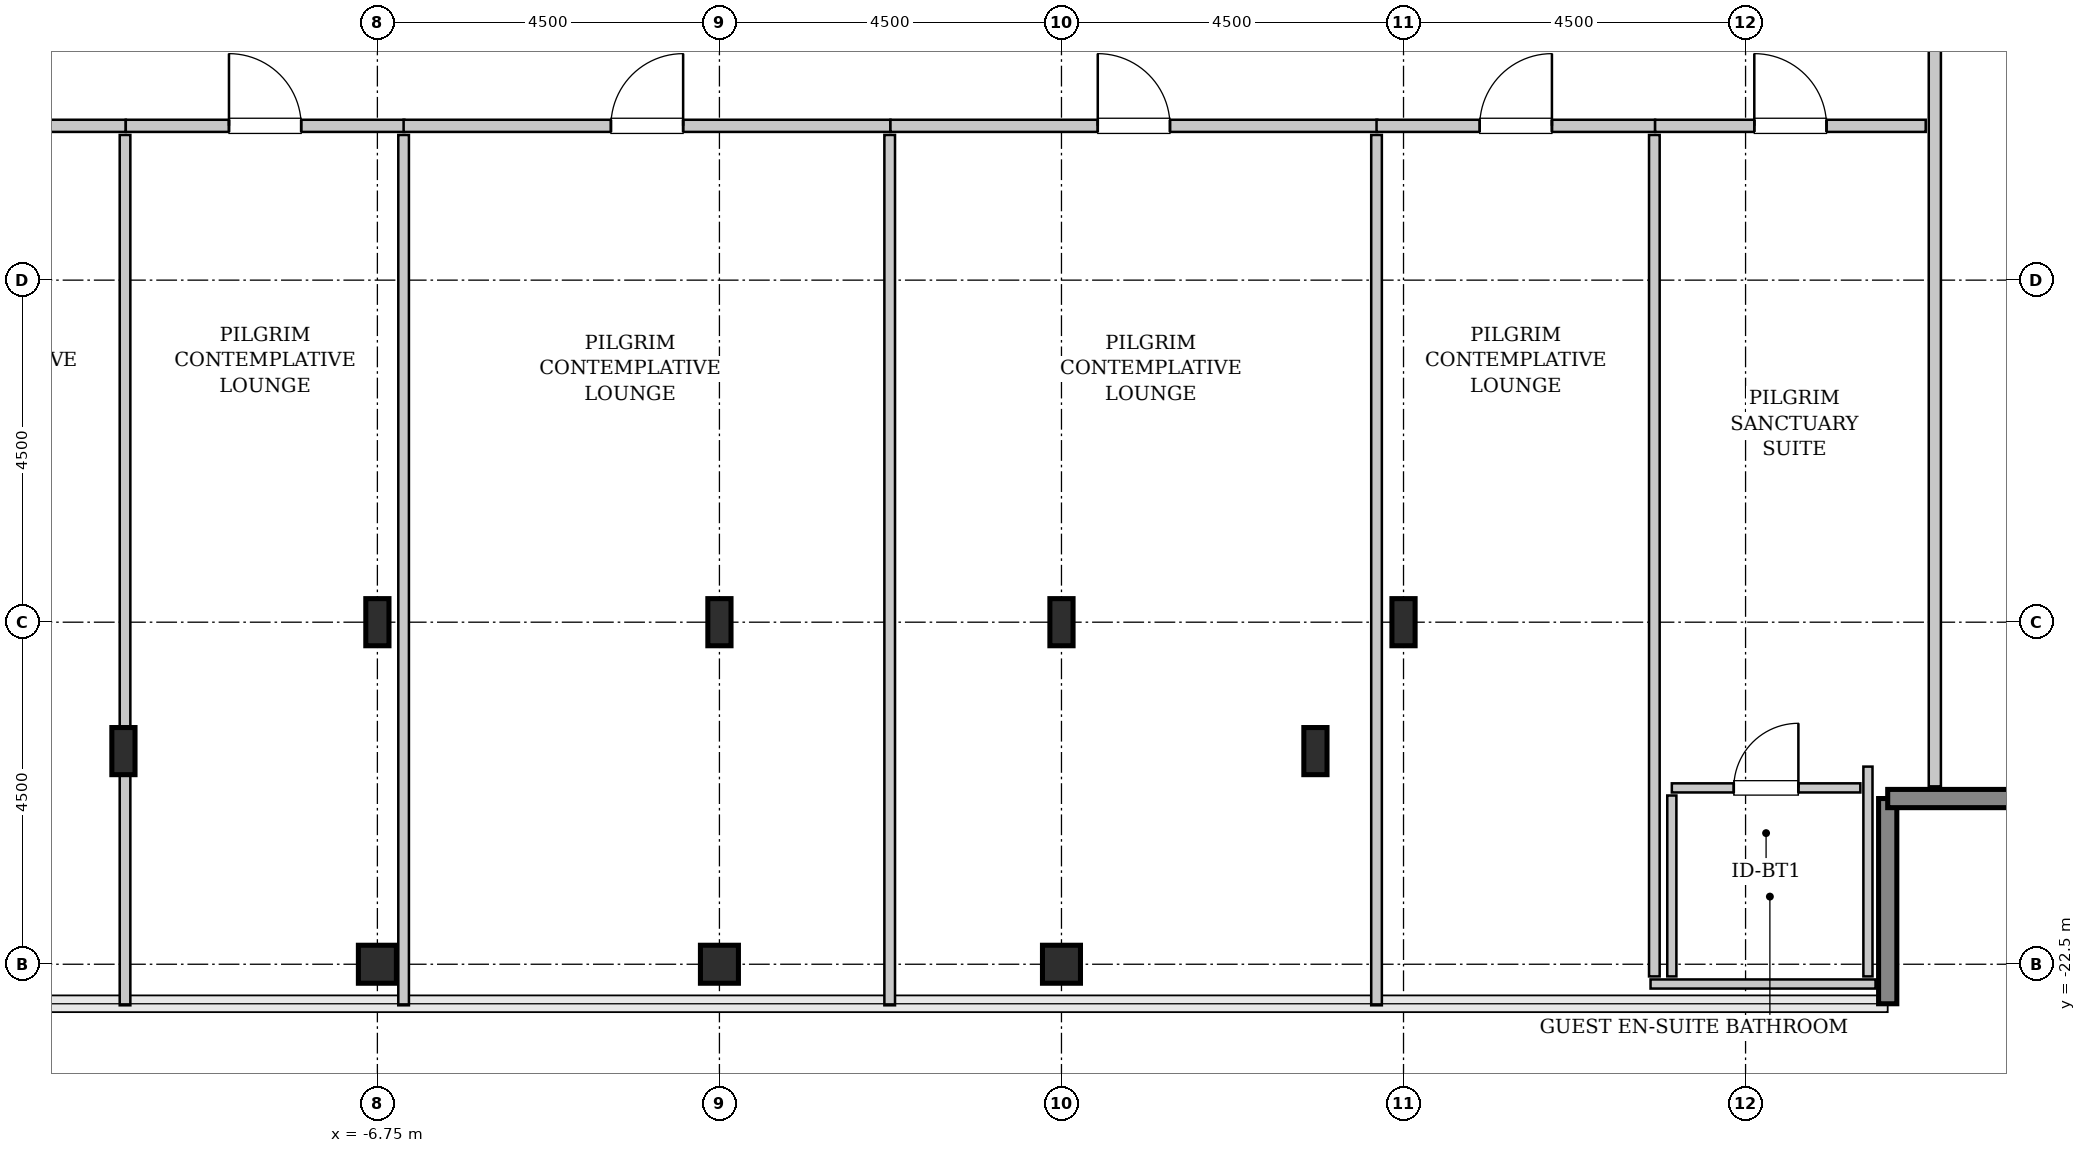
"""IFC4 building model, lengths in metres.
Left out: names, types, materials, properties, quantities, classifications, styles, units other than length and angle.
Written with IfcOpenShell. Run it as: python <this file> out.ifc"""

import sys

from ifc_helpers import new_model, si_unit, direction, frame, frame_2d, origin, origin_2d, place, context, subcontext, project, spatial, rectangle, hollow_rectangle, i_section, extrude, source, transform, mapped, element, fill, save


model = new_model("IFC4")
c1 = context("Model", 3, precision=1e-05, world=origin(), true_north=direction((0.0, 1.0)))
c2 = subcontext(c1, "Body", "Model", "MODEL_VIEW")
j1 = project(units=[si_unit("LENGTHUNIT", "METRE"), si_unit("PLANEANGLEUNIT", "RADIAN")], contexts=[c1])
p1 = place(None, origin())
s1 = spatial("IfcSite", under=j1, at=p1, CompositionType="ELEMENT")
p2 = place(p1, origin())
s2 = spatial("IfcBuilding", under=s1, at=p2, CompositionType="ELEMENT")
p3 = place(p2, frame((0.0, 0.0, 306.4)))
s3 = spatial("IfcBuildingStorey", under=s2, at=p3, CompositionType="ELEMENT", Elevation=306.4)
m1 = source(origin(), c2, "Body", "SweptSolid", [
    extrude(i_section(OverallWidth=0.305, OverallDepth=0.62, WebThickness=0.021, FlangeThickness=0.04, FilletRadius=0.027, at=origin_2d()), origin(), (0.0, 0.0, 1.0), 3.8),
])
p4 = place(p3, frame((-10.091, -19.696, 0.0), z_axis=(0.0, 0.0, 1.0), x_axis=(1.0, 0.0, 0.0)))
e1 = element("IfcColumn", 1, at=p4, inside=s3, PredefinedType="COLUMN", context=c2, shape_type="MappedRepresentation", body=[
    mapped(m1, transform((0.0, 0.0, 0.0), x_axis=(1.0, 0.0, 0.0), y_axis=(0.0, 1.0, 0.0), z_axis=(0.0, 0.0, 1.0), scale=1.0)),
])
m2 = source(origin(), c2, "Body", "SweptSolid", [
    extrude(hollow_rectangle(XDim=0.5, YDim=0.5, WallThickness=0.025, InnerFilletRadius=0.025, OuterFilletRadius=0.05, at=origin_2d()), origin(), (0.0, 0.0, 1.0), 3.8),
])
p5 = place(p3, frame((-6.75, -22.5, 0.0), z_axis=(0.0, 0.0, 1.0), x_axis=(1.0, 0.0, 0.0)))
e2 = element("IfcColumn", 2, at=p5, inside=s3, PredefinedType="COLUMN", context=c2, shape_type="MappedRepresentation", body=[
    mapped(m2, transform((0.0, 0.0, 0.0), x_axis=(1.0, 0.0, 0.0), y_axis=(0.0, 1.0, 0.0), z_axis=(0.0, 0.0, 1.0), scale=1.0)),
])
p6 = place(p3, frame((-6.75, -18.0, 0.0), z_axis=(0.0, 0.0, 1.0), x_axis=(1.0, 0.0, 0.0)))
e3 = element("IfcColumn", 3, at=p6, inside=s3, PredefinedType="COLUMN", context=c2, shape_type="MappedRepresentation", body=[
    mapped(m1, transform((0.0, 0.0, 0.0), x_axis=(1.0, 0.0, 0.0), y_axis=(0.0, 1.0, 0.0), z_axis=(0.0, 0.0, 1.0), scale=1.0)),
])
p7 = place(p3, frame((-2.25, -22.5, 0.0), z_axis=(0.0, 0.0, 1.0), x_axis=(1.0, 0.0, 0.0)))
e4 = element("IfcColumn", 4, at=p7, inside=s3, PredefinedType="COLUMN", context=c2, shape_type="MappedRepresentation", body=[
    mapped(m2, transform((0.0, 0.0, 0.0), x_axis=(1.0, 0.0, 0.0), y_axis=(0.0, 1.0, 0.0), z_axis=(0.0, 0.0, 1.0), scale=1.0)),
])
p8 = place(p3, frame((-2.25, -18.0, 0.0), z_axis=(0.0, 0.0, 1.0), x_axis=(1.0, 0.0, 0.0)))
e5 = element("IfcColumn", 5, at=p8, inside=s3, PredefinedType="COLUMN", context=c2, shape_type="MappedRepresentation", body=[
    mapped(m1, transform((0.0, 0.0, 0.0), x_axis=(1.0, 0.0, 0.0), y_axis=(0.0, 1.0, 0.0), z_axis=(0.0, 0.0, 1.0), scale=1.0)),
])
p9 = place(p3, frame((2.25, -22.5, 0.0), z_axis=(0.0, 0.0, 1.0), x_axis=(1.0, 0.0, 0.0)))
e6 = element("IfcColumn", 6, at=p9, inside=s3, PredefinedType="COLUMN", context=c2, shape_type="MappedRepresentation", body=[
    mapped(m2, transform((0.0, 0.0, 0.0), x_axis=(1.0, 0.0, 0.0), y_axis=(0.0, 1.0, 0.0), z_axis=(0.0, 0.0, 1.0), scale=1.0)),
])
for number, where, z_axis, x_axis in (
    (7, (2.25, -18.0, 0.0), (0.0, 0.0, 1.0), (1.0, 0.0, 0.0)),
    (8, (5.591, -19.696, 0.0), (0.0, 0.0, 1.0), (1.0, 0.0, 0.0)),
    (9, (6.75, -18.0, 0.0), (0.0, 0.0, 1.0), (1.0, 0.0, 0.0)),
):
    element("IfcColumn", number, at=place(p3, frame(where, z_axis=z_axis, x_axis=x_axis)), inside=s3, PredefinedType="COLUMN", context=c2, shape_type="MappedRepresentation", body=[
        mapped(m1, transform((0.0, 0.0, 0.0), x_axis=(1.0, 0.0, 0.0), y_axis=(0.0, 1.0, 0.0), z_axis=(0.0, 0.0, 1.0), scale=1.0)),
    ])
m3 = source(origin(), c2, "Body", "SweptSolid", [
    extrude(rectangle(XDim=2.7, YDim=0.24, at=frame_2d((1.35, 0.0))), origin(), (0.0, 0.0, 1.0), 3.55),
])
for number, where, z_axis, x_axis in (
    (10, (13.12, -23.02, 0.0), (0.0, 0.0, 1.0), (0.0, 1.0, 0.0)),
    (11, (13.12, -20.32, 0.0), (0.0, 0.0, 1.0), (1.0, 0.0, 0.0)),
):
    element("IfcWall", number, at=place(p3, frame(where, z_axis=z_axis, x_axis=x_axis)), inside=s3, PredefinedType="SHEAR", context=c2, shape_type="MappedRepresentation", body=[
        mapped(m3, transform((0.0, 0.0, 0.0), x_axis=(1.0, 0.0, 0.0), y_axis=(0.0, 1.0, 0.0), z_axis=(0.0, 0.0, 1.0), scale=1.0)),
    ])
m4 = source(origin(), c2, "Body", "SweptSolid", [
    extrude(rectangle(XDim=2.96, YDim=0.12, at=frame_2d((1.48, 0.0))), origin(), (0.0, 0.0, 1.0), 3.535),
])
p10 = place(p3, frame((10.0, -22.76, 0.0), z_axis=(0.0, 0.0, 1.0), x_axis=(1.0, 0.0, 0.0)))
e12 = element("IfcWall", 12, at=p10, inside=s3, PredefinedType="PLUMBINGWALL", context=c2, shape_type="MappedRepresentation", body=[
    mapped(m4, transform((0.0, 0.0, 0.0), x_axis=(1.0, 0.0, 0.0), y_axis=(0.0, 1.0, 0.0), z_axis=(0.0, 0.0, 1.0), scale=1.0)),
])
m5 = source(origin(), c2, "Body", "SweptSolid", [
    extrude(rectangle(XDim=2.76, YDim=0.12, at=frame_2d((1.38, 0.0))), origin(), (0.0, 0.0, 1.0), 3.535),
])
p11 = place(p3, frame((12.86, -22.66, 0.0), z_axis=(0.0, 0.0, 1.0), x_axis=(0.0, 1.0, 0.0)))
e13 = element("IfcWall", 13, at=p11, inside=s3, PredefinedType="PLUMBINGWALL", context=c2, shape_type="MappedRepresentation", body=[
    mapped(m5, transform((0.0, 0.0, 0.0), x_axis=(1.0, 0.0, 0.0), y_axis=(0.0, 1.0, 0.0), z_axis=(0.0, 0.0, 1.0), scale=1.0)),
])
m6 = source(origin(), c2, "Body", "SweptSolid", [
    extrude(rectangle(XDim=2.48, YDim=0.12, at=frame_2d((1.24, 0.0))), origin(), (0.0, 0.0, 1.0), 3.535),
])
p12 = place(p3, frame((10.28, -20.18, 0.0), z_axis=(0.0, 0.0, 1.0), x_axis=(1.0, 0.0, 0.0)))
e14 = element("IfcWall", 14, at=p12, inside=s3, PredefinedType="PLUMBINGWALL", context=c2, shape_type="MappedRepresentation", body=[
    mapped(m6, transform((0.0, 0.0, 0.0), x_axis=(1.0, 0.0, 0.0), y_axis=(0.0, 1.0, 0.0), z_axis=(0.0, 0.0, 1.0), scale=1.0)),
])
p13 = place(p12, frame((0.815, 0.0, 0.0)))
e15 = element("IfcOpeningElement", 15, at=p13, cuts=e14, PredefinedType="OPENING", context=c2, shape_type="SweptSolid", body=[
    extrude(rectangle(XDim=0.85, YDim=2.1, at=frame_2d((0.425, 1.05))), frame((0.0, 0.07, 0.0), z_axis=(0.0, -1.0, 0.0), x_axis=(1.0, 0.0, 0.0)), (0.0, 0.0, 1.0), 0.14),
])
m7 = source(origin(), c2, "Body", "SweptSolid", [
    extrude(rectangle(XDim=2.38, YDim=0.12, at=frame_2d((1.19, 0.0))), origin(), (0.0, 0.0, 1.0), 3.535),
])
p14 = place(p3, frame((10.28, -22.66, 0.0), z_axis=(0.0, 0.0, 1.0), x_axis=(0.0, 1.0, 0.0)))
e16 = element("IfcWall", 16, at=p14, inside=s3, PredefinedType="PLUMBINGWALL", context=c2, shape_type="MappedRepresentation", body=[
    mapped(m7, transform((0.0, 0.0, 0.0), x_axis=(1.0, 0.0, 0.0), y_axis=(0.0, 1.0, 0.0), z_axis=(0.0, 0.0, 1.0), scale=1.0)),
])
m8 = source(origin(), c2, "Body", "SweptSolid", [
    extrude(rectangle(XDim=14.365, YDim=0.16, at=frame_2d((7.183, 0.0))), origin(), (0.0, 0.0, 1.0), 3.535),
])
p15 = place(p3, frame((13.74, -20.16, 0.0), z_axis=(0.0, 0.0, 1.0), x_axis=(0.0, 1.0, 0.0)))
e17 = element("IfcWall", 17, at=p15, inside=s3, PredefinedType="PARTITIONING", context=c2, shape_type="MappedRepresentation", body=[
    mapped(m8, transform((0.0, 0.0, 0.0), x_axis=(1.0, 0.0, 0.0), y_axis=(0.0, 1.0, 0.0), z_axis=(0.0, 0.0, 1.0), scale=1.0)),
])
p16 = place(p15, frame((11.032, 0.0, 0.0)))
e18 = element("IfcOpeningElement", 18, at=p16, cuts=e17, PredefinedType="OPENING", context=c2, shape_type="SweptSolid", body=[
    extrude(rectangle(XDim=0.95, YDim=2.1, at=frame_2d((0.475, 1.05))), frame((0.0, 0.09, 0.0), z_axis=(0.0, -1.0, 0.0), x_axis=(1.0, 0.0, 0.0)), (0.0, 0.0, 1.0), 0.18),
])
m9 = source(origin(), c2, "Body", "SweptSolid", [
    extrude(rectangle(XDim=3.56, YDim=0.16, at=frame_2d((1.78, 0.0))), origin(), (0.0, 0.0, 1.0), 3.535),
])
p17 = place(p3, frame((-13.62, -11.47, 0.0), z_axis=(0.0, 0.0, 1.0), x_axis=(1.0, 0.0, 0.0)))
e19 = element("IfcWall", 19, at=p17, inside=s3, PredefinedType="PARTITIONING", context=c2, shape_type="MappedRepresentation", body=[
    mapped(m9, transform((0.0, 0.0, 0.0), x_axis=(1.0, 0.0, 0.0), y_axis=(0.0, 1.0, 0.0), z_axis=(0.0, 0.0, 1.0), scale=1.0)),
])
p18 = place(p17, frame((1.305, 0.0, 0.0)))
e20 = element("IfcOpeningElement", 20, at=p18, cuts=e19, PredefinedType="OPENING", context=c2, shape_type="SweptSolid", body=[
    extrude(rectangle(XDim=0.95, YDim=2.1, at=frame_2d((0.475, 1.05))), frame((0.0, 0.09, 0.0), z_axis=(0.0, -1.0, 0.0), x_axis=(1.0, 0.0, 0.0)), (0.0, 0.0, 1.0), 0.18),
])
m10 = source(origin(), c2, "Body", "SweptSolid", [
    extrude(rectangle(XDim=11.45, YDim=0.14, at=frame_2d((5.725, 0.0))), origin(), (0.0, 0.0, 1.0), 3.535),
])
p19 = place(p3, frame((-10.07, -23.04, 0.0), z_axis=(0.0, 0.0, 1.0), x_axis=(0.0, 1.0, 0.0)))
e21 = element("IfcWall", 21, at=p19, inside=s3, PredefinedType="PARTITIONING", context=c2, shape_type="MappedRepresentation", body=[
    mapped(m10, transform((0.0, 0.0, 0.0), x_axis=(1.0, 0.0, 0.0), y_axis=(0.0, 1.0, 0.0), z_axis=(0.0, 0.0, 1.0), scale=1.0)),
])
m11 = source(origin(), c2, "Body", "SweptSolid", [
    extrude(rectangle(XDim=3.665, YDim=0.16, at=frame_2d((1.833, 0.0))), origin(), (0.0, 0.0, 1.0), 3.535),
])
p20 = place(p3, frame((-10.06, -11.47, 0.0), z_axis=(0.0, 0.0, 1.0), x_axis=(1.0, 0.0, 0.0)))
e22 = element("IfcWall", 22, at=p20, inside=s3, PredefinedType="PARTITIONING", context=c2, shape_type="MappedRepresentation", body=[
    mapped(m11, transform((0.0, 0.0, 0.0), x_axis=(1.0, 0.0, 0.0), y_axis=(0.0, 1.0, 0.0), z_axis=(0.0, 0.0, 1.0), scale=1.0)),
])
p21 = place(p20, frame((1.357, 0.0, 0.0)))
e23 = element("IfcOpeningElement", 23, at=p21, cuts=e22, PredefinedType="OPENING", context=c2, shape_type="SweptSolid", body=[
    extrude(rectangle(XDim=0.95, YDim=2.1, at=frame_2d((0.475, 1.05))), frame((0.0, 0.09, 0.0), z_axis=(0.0, -1.0, 0.0), x_axis=(1.0, 0.0, 0.0)), (0.0, 0.0, 1.0), 0.18),
])
m12 = source(origin(), c2, "Body", "SweptSolid", [
    extrude(rectangle(XDim=11.45, YDim=0.14, at=frame_2d((5.725, 0.0))), origin(), (0.0, 0.0, 1.0), 2.975),
])
p22 = place(p3, frame((-6.405, -23.04, 0.0), z_axis=(0.0, 0.0, 1.0), x_axis=(0.0, 1.0, 0.0)))
e24 = element("IfcWall", 24, at=p22, inside=s3, PredefinedType="PARTITIONING", context=c2, shape_type="MappedRepresentation", body=[
    mapped(m12, transform((0.0, 0.0, 0.0), x_axis=(1.0, 0.0, 0.0), y_axis=(0.0, 1.0, 0.0), z_axis=(0.0, 0.0, 1.0), scale=1.0)),
])
m13 = source(origin(), c2, "Body", "SweptSolid", [
    extrude(rectangle(XDim=6.405, YDim=0.16, at=frame_2d((3.203, 0.0))), origin(), (0.0, 0.0, 1.0), 3.535),
])
p23 = place(p3, frame((-6.405, -11.47, 0.0), z_axis=(0.0, 0.0, 1.0), x_axis=(1.0, 0.0, 0.0)))
e25 = element("IfcWall", 25, at=p23, inside=s3, PredefinedType="PARTITIONING", context=c2, shape_type="MappedRepresentation", body=[
    mapped(m13, transform((0.0, 0.0, 0.0), x_axis=(1.0, 0.0, 0.0), y_axis=(0.0, 1.0, 0.0), z_axis=(0.0, 0.0, 1.0), scale=1.0)),
])
p24 = place(p23, frame((2.728, 0.0, 0.0)))
e26 = element("IfcOpeningElement", 26, at=p24, cuts=e25, PredefinedType="OPENING", context=c2, shape_type="SweptSolid", body=[
    extrude(rectangle(XDim=0.95, YDim=2.1, at=frame_2d((0.475, 1.05))), frame((0.0, 0.09, 0.0), z_axis=(0.0, -1.0, 0.0), x_axis=(1.0, 0.0, 0.0)), (0.0, 0.0, 1.0), 0.18),
])
p25 = place(p3, frame((-0.01, -23.04, 0.0), z_axis=(0.0, 0.0, 1.0), x_axis=(0.0, 1.0, 0.0)))
e27 = element("IfcWall", 27, at=p25, inside=s3, PredefinedType="PARTITIONING", context=c2, shape_type="MappedRepresentation", body=[
    mapped(m10, transform((0.0, 0.0, 0.0), x_axis=(1.0, 0.0, 0.0), y_axis=(0.0, 1.0, 0.0), z_axis=(0.0, 0.0, 1.0), scale=1.0)),
])
p26 = place(p3, frame((0.0, -11.47, 0.0), z_axis=(0.0, 0.0, 1.0), x_axis=(1.0, 0.0, 0.0)))
e28 = element("IfcWall", 28, at=p26, inside=s3, PredefinedType="PARTITIONING", context=c2, shape_type="MappedRepresentation", body=[
    mapped(m13, transform((0.0, 0.0, 0.0), x_axis=(1.0, 0.0, 0.0), y_axis=(0.0, 1.0, 0.0), z_axis=(0.0, 0.0, 1.0), scale=1.0)),
])
p27 = place(p26, frame((2.728, 0.0, 0.0)))
e29 = element("IfcOpeningElement", 29, at=p27, cuts=e28, PredefinedType="OPENING", context=c2, shape_type="SweptSolid", body=[
    extrude(rectangle(XDim=0.95, YDim=2.1, at=frame_2d((0.475, 1.05))), frame((0.0, 0.09, 0.0), z_axis=(0.0, -1.0, 0.0), x_axis=(1.0, 0.0, 0.0)), (0.0, 0.0, 1.0), 0.18),
])
p28 = place(p3, frame((6.395, -23.04, 0.0), z_axis=(0.0, 0.0, 1.0), x_axis=(0.0, 1.0, 0.0)))
e30 = element("IfcWall", 30, at=p28, inside=s3, PredefinedType="PARTITIONING", context=c2, shape_type="MappedRepresentation", body=[
    mapped(m10, transform((0.0, 0.0, 0.0), x_axis=(1.0, 0.0, 0.0), y_axis=(0.0, 1.0, 0.0), z_axis=(0.0, 0.0, 1.0), scale=1.0)),
])
p29 = place(p3, frame((6.395, -11.47, 0.0), z_axis=(0.0, 0.0, 1.0), x_axis=(1.0, 0.0, 0.0)))
e31 = element("IfcWall", 31, at=p29, inside=s3, PredefinedType="PARTITIONING", context=c2, shape_type="MappedRepresentation", body=[
    mapped(m11, transform((0.0, 0.0, 0.0), x_axis=(1.0, 0.0, 0.0), y_axis=(0.0, 1.0, 0.0), z_axis=(0.0, 0.0, 1.0), scale=1.0)),
])
p30 = place(p29, frame((1.357, 0.0, 0.0)))
e32 = element("IfcOpeningElement", 32, at=p30, cuts=e31, PredefinedType="OPENING", context=c2, shape_type="SweptSolid", body=[
    extrude(rectangle(XDim=0.95, YDim=2.1, at=frame_2d((0.475, 1.05))), frame((0.0, 0.09, 0.0), z_axis=(0.0, -1.0, 0.0), x_axis=(1.0, 0.0, 0.0)), (0.0, 0.0, 1.0), 0.18),
])
m14 = source(origin(), c2, "Body", "SweptSolid", [
    extrude(rectangle(XDim=11.07, YDim=0.14, at=frame_2d((5.535, 0.0))), origin(), (0.0, 0.0, 1.0), 3.535),
])
p31 = place(p3, frame((10.05, -22.66, 0.0), z_axis=(0.0, 0.0, 1.0), x_axis=(0.0, 1.0, 0.0)))
e33 = element("IfcWall", 33, at=p31, inside=s3, PredefinedType="PARTITIONING", context=c2, shape_type="MappedRepresentation", body=[
    mapped(m14, transform((0.0, 0.0, 0.0), x_axis=(1.0, 0.0, 0.0), y_axis=(0.0, 1.0, 0.0), z_axis=(0.0, 0.0, 1.0), scale=1.0)),
])
p32 = place(p3, frame((10.06, -11.47, 0.0), z_axis=(0.0, 0.0, 1.0), x_axis=(1.0, 0.0, 0.0)))
e34 = element("IfcWall", 34, at=p32, inside=s3, PredefinedType="PARTITIONING", context=c2, shape_type="MappedRepresentation", body=[
    mapped(m9, transform((0.0, 0.0, 0.0), x_axis=(1.0, 0.0, 0.0), y_axis=(0.0, 1.0, 0.0), z_axis=(0.0, 0.0, 1.0), scale=1.0)),
])
p33 = place(p32, frame((1.305, 0.0, 0.0)))
e35 = element("IfcOpeningElement", 35, at=p33, cuts=e34, PredefinedType="OPENING", context=c2, shape_type="SweptSolid", body=[
    extrude(rectangle(XDim=0.95, YDim=2.1, at=frame_2d((0.475, 1.05))), frame((0.0, 0.09, 0.0), z_axis=(0.0, -1.0, 0.0), x_axis=(1.0, 0.0, 0.0)), (0.0, 0.0, 1.0), 0.18),
])
m15 = source(origin(), c2, "Body", "SweptSolid", [
    extrude(rectangle(XDim=0.85, YDim=2.1, at=frame_2d((0.425, 1.05))), frame((0.0, 0.025, 0.0), z_axis=(0.0, -1.0, 0.0), x_axis=(1.0, 0.0, 0.0)), (0.0, 0.0, 1.0), 0.05),
])
p34 = place(p13, origin())
e36 = element("IfcDoor", 36, at=p34, inside=s3, OperationType="SINGLE_SWING_RIGHT", PredefinedType="DOOR", context=c2, shape_type="MappedRepresentation", body=[
    mapped(m15, transform((0.0, 0.0, 0.0), x_axis=(1.0, 0.0, 0.0), y_axis=(0.0, 1.0, 0.0), z_axis=(0.0, 0.0, 1.0), scale=1.0)),
])
fill(e15, e36)
m16 = source(origin(), c2, "Body", "SweptSolid", [
    extrude(rectangle(XDim=0.95, YDim=2.1, at=frame_2d((0.475, 1.05))), frame((0.0, 0.025, 0.0), z_axis=(0.0, -1.0, 0.0), x_axis=(1.0, 0.0, 0.0)), (0.0, 0.0, 1.0), 0.05),
])
p35 = place(p21, origin())
e37 = element("IfcDoor", 37, at=p35, inside=s3, OperationType="SINGLE_SWING_LEFT", PredefinedType="DOOR", context=c2, shape_type="MappedRepresentation", body=[
    mapped(m16, transform((0.0, 0.0, 0.0), x_axis=(1.0, 0.0, 0.0), y_axis=(0.0, 1.0, 0.0), z_axis=(0.0, 0.0, 1.0), scale=1.0)),
])
fill(e23, e37)
p36 = place(p24, origin())
e38 = element("IfcDoor", 38, at=p36, inside=s3, OperationType="SINGLE_SWING_RIGHT", PredefinedType="DOOR", context=c2, shape_type="MappedRepresentation", body=[
    mapped(m16, transform((0.0, 0.0, 0.0), x_axis=(1.0, 0.0, 0.0), y_axis=(0.0, 1.0, 0.0), z_axis=(0.0, 0.0, 1.0), scale=1.0)),
])
fill(e26, e38)
p37 = place(p27, origin())
e39 = element("IfcDoor", 39, at=p37, inside=s3, OperationType="SINGLE_SWING_LEFT", PredefinedType="DOOR", context=c2, shape_type="MappedRepresentation", body=[
    mapped(m16, transform((0.0, 0.0, 0.0), x_axis=(1.0, 0.0, 0.0), y_axis=(0.0, 1.0, 0.0), z_axis=(0.0, 0.0, 1.0), scale=1.0)),
])
fill(e29, e39)
p38 = place(p30, origin())
e40 = element("IfcDoor", 40, at=p38, inside=s3, OperationType="SINGLE_SWING_RIGHT", PredefinedType="DOOR", context=c2, shape_type="MappedRepresentation", body=[
    mapped(m16, transform((0.0, 0.0, 0.0), x_axis=(1.0, 0.0, 0.0), y_axis=(0.0, 1.0, 0.0), z_axis=(0.0, 0.0, 1.0), scale=1.0)),
])
fill(e32, e40)
p39 = place(p33, origin())
e41 = element("IfcDoor", 41, at=p39, inside=s3, OperationType="SINGLE_SWING_LEFT", PredefinedType="DOOR", context=c2, shape_type="MappedRepresentation", body=[
    mapped(m16, transform((0.0, 0.0, 0.0), x_axis=(1.0, 0.0, 0.0), y_axis=(0.0, 1.0, 0.0), z_axis=(0.0, 0.0, 1.0), scale=1.0)),
])
fill(e35, e41)
save(model, sys.argv[1])
